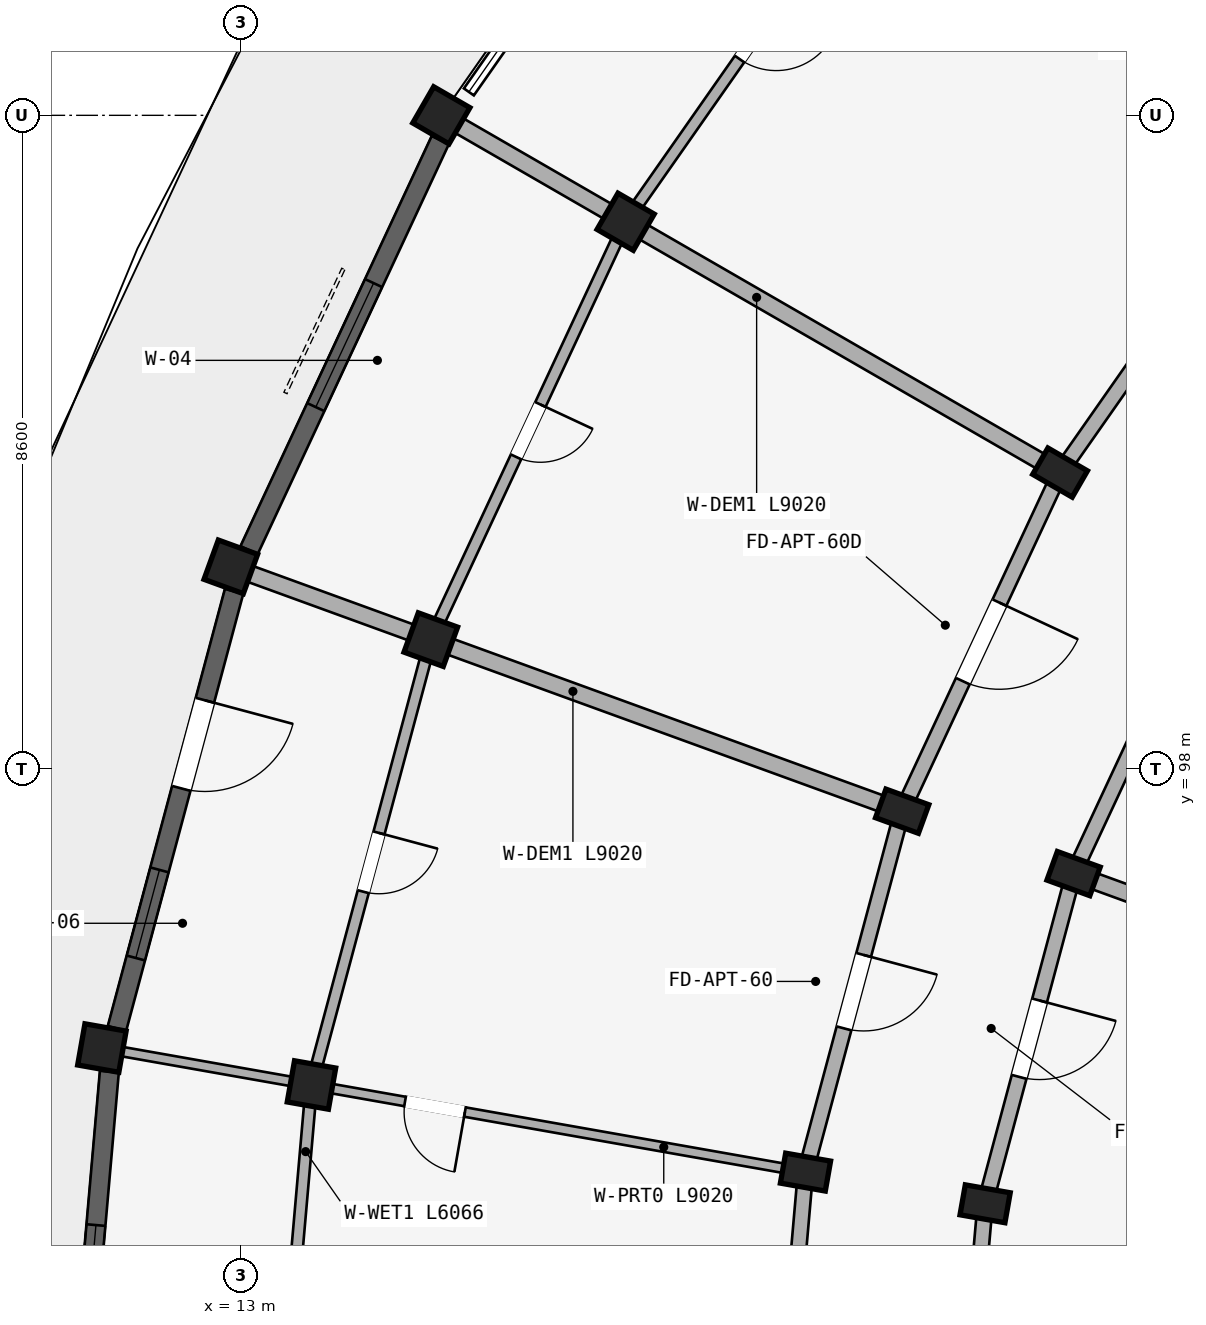
"""IFC4 building model, lengths in metres.
Left out: names, types, materials, properties, quantities, classifications, styles, units other than length and angle.
Written with IfcOpenShell. Run it as: python <this file> out.ifc"""

import sys

from ifc_helpers import new_model, si_unit, direction, frame, frame_2d, origin, origin_2d, place, context, subcontext, project, spatial, rectangle, extrude, element, fill, save


model = new_model("IFC4")
c1 = context("Model", 3, precision=1e-05, world=origin(), true_north=direction((0.0, 1.0)))
c2 = subcontext(c1, "Body", "Model", "MODEL_VIEW")
j1 = project(units=[si_unit("LENGTHUNIT", "METRE"), si_unit("PLANEANGLEUNIT", "RADIAN")], contexts=[c1])
p1 = place(None, origin())
s1 = spatial("IfcSite", under=j1, at=p1, CompositionType="ELEMENT")
p2 = place(p1, origin())
s2 = spatial("IfcBuilding", under=s1, at=p2, CompositionType="ELEMENT")
p3 = place(p2, frame((0.0, 0.0, 46.5)))
s3 = spatial("IfcBuildingStorey", under=s2, at=p3, CompositionType="ELEMENT", Elevation=46.5)
p4 = place(p3, frame((23.778, 101.9, 0.0), z_axis=(0.0, 0.0, 1.0), x_axis=(0.5, 0.866025403784, 0.0)))
e1 = element("IfcColumn", 1, at=p4, inside=s3, PredefinedType="COLUMN", context=c2, shape_type="SweptSolid", body=[
    extrude(rectangle(XDim=0.4, YDim=0.6, at=origin_2d()), origin(), (0.0, 0.0, 1.0), 2.93),
])
p5 = place(p3, frame((18.062, 105.2, 0.0), z_axis=(0.0, 0.0, 1.0), x_axis=(0.5, 0.866025403784, 0.0)))
e2 = element("IfcColumn", 2, at=p5, inside=s3, PredefinedType="COLUMN", context=c2, shape_type="SweptSolid", body=[
    extrude(rectangle(XDim=0.55, YDim=0.55, at=origin_2d()), origin(), (0.0, 0.0, 1.0), 2.93),
])
p6 = place(p3, frame((15.637, 106.6, 0.0), z_axis=(0.0, 0.0, 1.0), x_axis=(0.5, 0.866025403784, 0.0)))
e3 = element("IfcColumn", 3, at=p6, inside=s3, PredefinedType="COLUMN", context=c2, shape_type="SweptSolid", body=[
    extrude(rectangle(XDim=0.55, YDim=0.55, at=origin_2d()), origin(), (0.0, 0.0, 1.0), 2.97),
])
for number, where, z_axis, x_axis in (
    (4, (23.956, 96.624, 0.0), (0.0, 0.0, 1.0), (0.342, 0.94, 0.0)),
    (5, (21.701, 97.445, 0.0), (0.0, 0.0, 1.0), (0.342, 0.94, 0.0)),
):
    element("IfcColumn", number, at=place(p3, frame(where, z_axis=z_axis, x_axis=x_axis)), inside=s3, PredefinedType="COLUMN", context=c2, shape_type="SweptSolid", body=[
        extrude(rectangle(XDim=0.4, YDim=0.6, at=origin_2d()), origin(), (0.0, 0.0, 1.0), 2.93),
    ])
p7 = place(p3, frame((15.499, 99.702, 0.0), z_axis=(0.0, 0.0, 1.0), x_axis=(0.342020143326, 0.939692620786, 0.0)))
e6 = element("IfcColumn", 6, at=p7, inside=s3, PredefinedType="COLUMN", context=c2, shape_type="SweptSolid", body=[
    extrude(rectangle(XDim=0.55, YDim=0.55, at=origin_2d()), origin(), (0.0, 0.0, 1.0), 2.93),
])
p8 = place(p3, frame((12.868, 100.66, 0.0), z_axis=(0.0, 0.0, 1.0), x_axis=(0.342020143326, 0.939692620786, 0.0)))
e7 = element("IfcColumn", 7, at=p8, inside=s3, PredefinedType="COLUMN", context=c2, shape_type="SweptSolid", body=[
    extrude(rectangle(XDim=0.55, YDim=0.55, at=origin_2d()), origin(), (0.0, 0.0, 1.0), 2.97),
])
for number, where, z_axis, x_axis in (
    (8, (22.792, 92.28, 0.0), (0.0, 0.0, 1.0), (0.174, 0.985, 0.0)),
    (9, (20.428, 92.697, 0.0), (0.0, 0.0, 1.0), (0.174, 0.985, 0.0)),
):
    element("IfcColumn", number, at=place(p3, frame(where, z_axis=z_axis, x_axis=x_axis)), inside=s3, PredefinedType="COLUMN", context=c2, shape_type="SweptSolid", body=[
        extrude(rectangle(XDim=0.4, YDim=0.6, at=origin_2d()), origin(), (0.0, 0.0, 1.0), 2.93),
    ])
p9 = place(p3, frame((13.929, 93.843, 0.0), z_axis=(0.0, 0.0, 1.0), x_axis=(0.173648177667, 0.984807753012, 0.0)))
e10 = element("IfcColumn", 10, at=p9, inside=s3, PredefinedType="COLUMN", context=c2, shape_type="SweptSolid", body=[
    extrude(rectangle(XDim=0.55, YDim=0.55, at=origin_2d()), origin(), (0.0, 0.0, 1.0), 2.93),
])
p10 = place(p3, frame((11.171, 94.329, 0.0), z_axis=(0.0, 0.0, 1.0), x_axis=(0.173648177667, 0.984807753012, 0.0)))
e11 = element("IfcColumn", 11, at=p10, inside=s3, PredefinedType="COLUMN", context=c2, shape_type="SweptSolid", body=[
    extrude(rectangle(XDim=0.55, YDim=0.55, at=origin_2d()), origin(), (0.0, 0.0, 1.0), 2.97),
])
p11 = place(p3, frame((26.598, 105.927, 0.0), z_axis=(0.0, 0.0, 1.0), x_axis=(-0.573592335331, -0.819140911474, 0.0)))
e12 = element("IfcWall", 12, at=p11, inside=s3, PredefinedType="STANDARD", context=c2, shape_type="SweptSolid", body=[
    extrude(rectangle(XDim=4.916, YDim=0.2, at=frame_2d((2.458, 0.0))), origin(), (0.0, 0.0, 1.0), 2.372),
])
p12 = place(p3, frame((25.856, 100.7, 0.0), z_axis=(0.0, 0.0, 1.0), x_axis=(-0.422617978463, -0.906307919131, 0.0)))
e13 = element("IfcWall", 13, at=p12, inside=s3, PredefinedType="STANDARD", context=c2, shape_type="SweptSolid", body=[
    extrude(rectangle(XDim=4.497, YDim=0.2, at=frame_2d((2.249, 0.0))), origin(), (0.0, 0.0, 1.0), 2.372),
])
p13 = place(p3, frame((23.778, 101.9, 0.0), z_axis=(0.0, 0.0, 1.0), x_axis=(-0.422629854778, -0.906302381024, 0.0)))
e14 = element("IfcWall", 14, at=p13, inside=s3, PredefinedType="STANDARD", context=c2, shape_type="SweptSolid", body=[
    extrude(rectangle(XDim=4.915, YDim=0.2, at=frame_2d((2.458, 0.0))), origin(), (0.0, 0.0, 1.0), 2.372),
])
p14 = place(p13, frame((1.888, 0.0, 0.0)))
e15 = element("IfcOpeningElement", 15, at=p14, cuts=e14, PredefinedType="OPENING", context=c2, shape_type="SweptSolid", body=[
    extrude(rectangle(XDim=1.14, YDim=2.15, at=frame_2d((0.57, 1.075))), frame((0.0, 0.11, 0.0), z_axis=(0.0, -1.0, 0.0), x_axis=(1.0, 0.0, 0.0)), (0.0, 0.0, 1.0), 0.22),
])
p15 = place(p3, frame((23.956, 96.624, 0.0), z_axis=(0.0, 0.0, 1.0), x_axis=(-0.258787642463, -0.965934240054, 0.0)))
e16 = element("IfcWall", 16, at=p15, inside=s3, PredefinedType="STANDARD", context=c2, shape_type="SweptSolid", body=[
    extrude(rectangle(XDim=4.497, YDim=0.2, at=frame_2d((2.249, 0.0))), origin(), (0.0, 0.0, 1.0), 2.372),
])
p16 = place(p15, frame((1.729, 0.0, 0.0)))
e17 = element("IfcOpeningElement", 17, at=p16, cuts=e16, PredefinedType="OPENING", context=c2, shape_type="SweptSolid", body=[
    extrude(rectangle(XDim=1.04, YDim=2.15, at=frame_2d((0.52, 1.075))), frame((0.0, 0.11, 0.0), z_axis=(0.0, -1.0, 0.0), x_axis=(1.0, 0.0, 0.0)), (0.0, 0.0, 1.0), 0.22),
])
p17 = place(p3, frame((21.701, 97.445, 0.0), z_axis=(0.0, 0.0, 1.0), x_axis=(-0.258803112091, -0.965930095386, 0.0)))
e18 = element("IfcWall", 18, at=p17, inside=s3, PredefinedType="STANDARD", context=c2, shape_type="SweptSolid", body=[
    extrude(rectangle(XDim=4.916, YDim=0.2, at=frame_2d((2.458, 0.0))), origin(), (0.0, 0.0, 1.0), 2.372),
])
p18 = place(p17, frame((1.958, 0.0, 0.0)))
e19 = element("IfcOpeningElement", 19, at=p18, cuts=e18, PredefinedType="OPENING", context=c2, shape_type="SweptSolid", body=[
    extrude(rectangle(XDim=1.0, YDim=2.15, at=frame_2d((0.5, 1.075))), frame((0.0, 0.11, 0.0), z_axis=(0.0, -1.0, 0.0), x_axis=(1.0, 0.0, 0.0)), (0.0, 0.0, 1.0), 0.22),
])
p19 = place(p3, frame((22.792, 92.28, 0.0), z_axis=(0.0, 0.0, 1.0), x_axis=(-0.087187153726, -0.996191949488, 0.0)))
e20 = element("IfcWall", 20, at=p19, inside=s3, PredefinedType="STANDARD", context=c2, shape_type="SweptSolid", body=[
    extrude(rectangle(XDim=4.497, YDim=0.2, at=frame_2d((2.249, 0.0))), origin(), (0.0, 0.0, 1.0), 2.372),
])
p20 = place(p3, frame((20.428, 92.697, 0.0), z_axis=(0.0, 0.0, 1.0), x_axis=(-0.087167566415, -0.996193663584, 0.0)))
e21 = element("IfcWall", 21, at=p20, inside=s3, PredefinedType="STANDARD", context=c2, shape_type="SweptSolid", body=[
    extrude(rectangle(XDim=4.916, YDim=0.2, at=frame_2d((2.458, 0.0))), origin(), (0.0, 0.0, 1.0), 2.372),
])
p21 = place(p3, frame((26.521, 105.991, 0.0), z_axis=(0.0, 0.0, 1.0), x_axis=(-0.766047078847, 0.642784468535, 0.0)))
e22 = element("IfcWall", 22, at=p21, inside=s3, PredefinedType="PARTITIONING", context=c2, shape_type="SweptSolid", body=[
    extrude(rectangle(XDim=9.02, YDim=0.125, at=frame_2d((4.51, 0.0))), origin(), (0.0, 0.0, 1.0), 2.372),
])
p22 = place(p21, frame((4.45, 0.0, 0.0)))
e23 = element("IfcOpeningElement", 23, at=p22, cuts=e22, PredefinedType="OPENING", context=c2, shape_type="SweptSolid", body=[
    extrude(rectangle(XDim=0.8, YDim=2.1, at=frame_2d((0.4, 1.05))), frame((0.0, 0.073, 0.0), z_axis=(0.0, -1.0, 0.0), x_axis=(1.0, 0.0, 0.0)), (0.0, 0.0, 1.0), 0.145),
])
p23 = place(p3, frame((23.691, 101.95, 0.0), z_axis=(0.0, 0.0, 1.0), x_axis=(-0.866024222538, 0.500002045973, 0.0)))
e24 = element("IfcWall", 24, at=p23, inside=s3, PredefinedType="STANDARD", context=c2, shape_type="SweptSolid", body=[
    extrude(rectangle(XDim=9.02, YDim=0.22, at=frame_2d((4.51, 0.0))), origin(), (0.0, 0.0, 1.0), 2.372),
])
p24 = place(p3, frame((30.346, 94.298, 0.0), z_axis=(0.0, 0.0, 1.0), x_axis=(-0.939696231917, 0.342010221662, 0.0)))
e25 = element("IfcWall", 25, at=p24, inside=s3, PredefinedType="STANDARD", context=c2, shape_type="SweptSolid", body=[
    extrude(rectangle(XDim=6.75, YDim=0.22, at=frame_2d((3.375, 0.0))), origin(), (0.0, 0.0, 1.0), 2.372),
])
p25 = place(p3, frame((21.607, 97.479, 0.0), z_axis=(0.0, 0.0, 1.0), x_axis=(-0.939695392201, 0.342012528828, 0.0)))
e26 = element("IfcWall", 26, at=p25, inside=s3, PredefinedType="STANDARD", context=c2, shape_type="SweptSolid", body=[
    extrude(rectangle(XDim=9.02, YDim=0.22, at=frame_2d((4.51, 0.0))), origin(), (0.0, 0.0, 1.0), 2.372),
])
p26 = place(p3, frame((20.33, 92.714, 0.0), z_axis=(0.0, 0.0, 1.0), x_axis=(-0.98480997874, 0.173635554464, 0.0)))
e27 = element("IfcWall", 27, at=p26, inside=s3, PredefinedType="PARTITIONING", context=c2, shape_type="SweptSolid", body=[
    extrude(rectangle(XDim=9.02, YDim=0.125, at=frame_2d((4.51, 0.0))), origin(), (0.0, 0.0, 1.0), 2.372),
])
p27 = place(p26, frame((4.45, 0.0, 0.0)))
e28 = element("IfcOpeningElement", 28, at=p27, cuts=e27, PredefinedType="OPENING", context=c2, shape_type="SweptSolid", body=[
    extrude(rectangle(XDim=0.8, YDim=2.1, at=frame_2d((0.4, 1.05))), frame((0.0, 0.073, 0.0), z_axis=(0.0, -1.0, 0.0), x_axis=(1.0, 0.0, 0.0)), (0.0, 0.0, 1.0), 0.145),
])
p28 = place(p3, frame((21.542, 110.169, 0.0), z_axis=(0.0, 0.0, 1.0), x_axis=(-0.573594691504, -0.81913926159, 0.0)))
e29 = element("IfcWall", 29, at=p28, inside=s3, PredefinedType="PLUMBINGWALL", context=c2, shape_type="SweptSolid", body=[
    extrude(rectangle(XDim=6.066, YDim=0.15, at=frame_2d((3.033, 0.0))), origin(), (0.0, 0.0, 1.0), 2.372),
])
p29 = place(p28, frame((2.613, 0.0, 0.0)))
e30 = element("IfcOpeningElement", 30, at=p29, cuts=e29, PredefinedType="OPENING", context=c2, shape_type="SweptSolid", body=[
    extrude(rectangle(XDim=0.84, YDim=2.1, at=frame_2d((0.42, 1.05))), frame((0.0, 0.085, 0.0), z_axis=(0.0, -1.0, 0.0), x_axis=(1.0, 0.0, 0.0)), (0.0, 0.0, 1.0), 0.17),
])
p30 = place(p3, frame((18.062, 105.2, 0.0), z_axis=(0.0, 0.0, 1.0), x_axis=(-0.42260781991, -0.906312656069, 0.0)))
e31 = element("IfcWall", 31, at=p30, inside=s3, PredefinedType="PLUMBINGWALL", context=c2, shape_type="SweptSolid", body=[
    extrude(rectangle(XDim=6.066, YDim=0.15, at=frame_2d((3.033, 0.0))), origin(), (0.0, 0.0, 1.0), 2.372),
])
p31 = place(p30, frame((2.653, 0.0, 0.0)))
e32 = element("IfcOpeningElement", 32, at=p31, cuts=e31, PredefinedType="OPENING", context=c2, shape_type="SweptSolid", body=[
    extrude(rectangle(XDim=0.76, YDim=2.05, at=frame_2d((0.38, 1.025))), frame((0.0, 0.085, 0.0), z_axis=(0.0, -1.0, 0.0), x_axis=(1.0, 0.0, 0.0)), (0.0, 0.0, 1.0), 0.17),
])
p32 = place(p3, frame((15.499, 99.702, 0.0), z_axis=(0.0, 0.0, 1.0), x_axis=(-0.258827283048, -0.965923618901, 0.0)))
e33 = element("IfcWall", 33, at=p32, inside=s3, PredefinedType="PLUMBINGWALL", context=c2, shape_type="SweptSolid", body=[
    extrude(rectangle(XDim=6.066, YDim=0.15, at=frame_2d((3.033, 0.0))), origin(), (0.0, 0.0, 1.0), 2.372),
])
p33 = place(p32, frame((2.633, 0.0, 0.0)))
e34 = element("IfcOpeningElement", 34, at=p33, cuts=e33, PredefinedType="OPENING", context=c2, shape_type="SweptSolid", body=[
    extrude(rectangle(XDim=0.8, YDim=2.1, at=frame_2d((0.4, 1.05))), frame((0.0, 0.085, 0.0), z_axis=(0.0, -1.0, 0.0), x_axis=(1.0, 0.0, 0.0)), (0.0, 0.0, 1.0), 0.17),
])
p34 = place(p3, frame((13.929, 93.843, 0.0), z_axis=(0.0, 0.0, 1.0), x_axis=(-0.087174938512, -0.996193018494, 0.0)))
e35 = element("IfcWall", 35, at=p34, inside=s3, PredefinedType="PLUMBINGWALL", context=c2, shape_type="SweptSolid", body=[
    extrude(rectangle(XDim=6.066, YDim=0.15, at=frame_2d((3.033, 0.0))), origin(), (0.0, 0.0, 1.0), 2.372),
])
p35 = place(p34, frame((2.613, 0.0, 0.0)))
e36 = element("IfcOpeningElement", 36, at=p35, cuts=e35, PredefinedType="OPENING", context=c2, shape_type="SweptSolid", body=[
    extrude(rectangle(XDim=0.84, YDim=2.1, at=frame_2d((0.42, 1.05))), frame((0.0, 0.085, 0.0), z_axis=(0.0, -1.0, 0.0), x_axis=(1.0, 0.0, 0.0)), (0.0, 0.0, 1.0), 0.17),
])
p36 = place(p3, frame((15.624, 106.275, 0.0), z_axis=(0.0, 0.0, 1.0), x_axis=(-0.422636229619, -0.90629940826, 0.0)))
e37 = element("IfcWall", 37, at=p36, inside=s3, PredefinedType="STANDARD", context=c2, shape_type="SweptSolid", body=[
    extrude(rectangle(XDim=5.953, YDim=0.25, at=frame_2d((2.977, 0.0))), origin(), (0.0, 0.0, 1.0), 2.48),
])
p37 = place(p36, frame((2.076, 0.0, 0.63)))
e38 = element("IfcOpeningElement", 38, at=p37, cuts=e37, PredefinedType="OPENING", context=c2, shape_type="SweptSolid", body=[
    extrude(rectangle(XDim=1.8, YDim=1.65, at=frame_2d((0.9, 0.825))), frame((0.0, 0.135, 0.0), z_axis=(0.0, -1.0, 0.0), x_axis=(1.0, 0.0, 0.0)), (0.0, 0.0, 1.0), 0.27),
])
p38 = place(p3, frame((12.91, 100.337, 0.0), z_axis=(0.0, 0.0, 1.0), x_axis=(-0.258818764656, -0.965925901434, 0.0)))
e39 = element("IfcWall", 39, at=p38, inside=s3, PredefinedType="STANDARD", context=c2, shape_type="SweptSolid", body=[
    extrude(rectangle(XDim=5.953, YDim=0.25, at=frame_2d((2.977, 0.0))), origin(), (0.0, 0.0, 1.0), 2.48),
])
p39 = place(p38, frame((3.793, 0.0, 0.38)))
e40 = element("IfcOpeningElement", 40, at=p39, cuts=e39, PredefinedType="OPENING", context=c2, shape_type="SweptSolid", body=[
    extrude(rectangle(XDim=1.2, YDim=1.5, at=frame_2d((0.6, 0.75))), frame((0.0, 0.135, 0.0), z_axis=(0.0, -1.0, 0.0), x_axis=(1.0, 0.0, 0.0)), (0.0, 0.0, 1.0), 0.27),
])
p40 = place(p38, frame((1.484, 0.0, 0.0)))
e41 = element("IfcOpeningElement", 41, at=p40, cuts=e39, PredefinedType="OPENING", context=c2, shape_type="SweptSolid", body=[
    extrude(rectangle(XDim=1.2, YDim=2.15, at=frame_2d((0.6, 1.075))), frame((0.0, 0.135, 0.0), z_axis=(0.0, -1.0, 0.0), x_axis=(1.0, 0.0, 0.0)), (0.0, 0.0, 1.0), 0.27),
])
p41 = place(p3, frame((11.27, 94.019, 0.0), z_axis=(0.0, 0.0, 1.0), x_axis=(-0.087151687417, -0.996195052879, 0.0)))
e42 = element("IfcWall", 42, at=p41, inside=s3, PredefinedType="STANDARD", context=c2, shape_type="SweptSolid", body=[
    extrude(rectangle(XDim=5.953, YDim=0.25, at=frame_2d((2.977, 0.0))), origin(), (0.0, 0.0, 1.0), 2.48),
])
p42 = place(p41, frame((2.027, 0.0, 0.53)))
e43 = element("IfcOpeningElement", 43, at=p42, cuts=e42, PredefinedType="OPENING", context=c2, shape_type="SweptSolid", body=[
    extrude(rectangle(XDim=1.9, YDim=1.75, at=frame_2d((0.95, 0.875))), frame((0.0, 0.135, 0.0), z_axis=(0.0, -1.0, 0.0), x_axis=(1.0, 0.0, 0.0)), (0.0, 0.0, 1.0), 0.27),
])
p43 = place(p37, origin())
e44 = element("IfcWindow", 44, at=p43, inside=s3, PartitioningType="DOUBLE_PANEL_VERTICAL", PredefinedType="WINDOW", context=c2, shape_type="SweptSolid", body=[
    extrude(rectangle(XDim=1.8, YDim=1.65, at=frame_2d((0.9, 0.825))), frame((0.0, 0.03, 0.0), z_axis=(0.0, -1.0, 0.0), x_axis=(1.0, 0.0, 0.0)), (0.0, 0.0, 1.0), 0.06),
])
fill(e38, e44)
p44 = place(p39, origin())
e45 = element("IfcWindow", 45, at=p44, inside=s3, PartitioningType="SINGLE_PANEL", PredefinedType="WINDOW", context=c2, shape_type="SweptSolid", body=[
    extrude(rectangle(XDim=1.2, YDim=1.5, at=frame_2d((0.6, 0.75))), frame((0.0, 0.03, 0.0), z_axis=(0.0, -1.0, 0.0), x_axis=(1.0, 0.0, 0.0)), (0.0, 0.0, 1.0), 0.06),
])
fill(e40, e45)
p45 = place(p42, origin())
e46 = element("IfcWindow", 46, at=p45, inside=s3, PartitioningType="DOUBLE_PANEL_VERTICAL", PredefinedType="WINDOW", context=c2, shape_type="SweptSolid", body=[
    extrude(rectangle(XDim=1.9, YDim=1.75, at=frame_2d((0.95, 0.875))), frame((0.0, 0.03, 0.0), z_axis=(0.0, -1.0, 0.0), x_axis=(1.0, 0.0, 0.0)), (0.0, 0.0, 1.0), 0.06),
])
fill(e43, e46)
p46 = place(p27, origin())
e47 = element("IfcDoor", 47, at=p46, inside=s3, OperationType="SINGLE_SWING_LEFT", PredefinedType="DOOR", context=c2, shape_type="SweptSolid", body=[
    extrude(rectangle(XDim=0.8, YDim=2.1, at=frame_2d((0.4, 1.05))), frame((0.0, 0.025, 0.0), z_axis=(0.0, -1.0, 0.0), x_axis=(1.0, 0.0, 0.0)), (0.0, 0.0, 1.0), 0.05),
])
fill(e28, e47)
p47 = place(p29, frame((0.84, 0.0, 0.0), z_axis=(0.0, 0.0, 1.0), x_axis=(-1.0, 0.0, 0.0)))
e48 = element("IfcDoor", 48, at=p47, inside=s3, OperationType="SINGLE_SWING_RIGHT", PredefinedType="DOOR", context=c2, shape_type="SweptSolid", body=[
    extrude(rectangle(XDim=0.84, YDim=2.1, at=frame_2d((0.42, 1.05))), frame((0.0, 0.025, 0.0), z_axis=(0.0, -1.0, 0.0), x_axis=(1.0, 0.0, 0.0)), (0.0, 0.0, 1.0), 0.05),
])
fill(e30, e48)
p48 = place(p14, origin())
e49 = element("IfcDoor", 49, at=p48, inside=s3, OperationType="SINGLE_SWING_LEFT", PredefinedType="DOOR", context=c2, shape_type="SweptSolid", body=[
    extrude(rectangle(XDim=1.14, YDim=2.15, at=frame_2d((0.57, 1.075))), frame((0.0, 0.025, 0.0), z_axis=(0.0, -1.0, 0.0), x_axis=(1.0, 0.0, 0.0)), (0.0, 0.0, 1.0), 0.05),
])
fill(e15, e49)
p49 = place(p31, frame((0.76, 0.0, 0.0), z_axis=(0.0, 0.0, 1.0), x_axis=(-1.0, 0.0, 0.0)))
e50 = element("IfcDoor", 50, at=p49, inside=s3, OperationType="SINGLE_SWING_RIGHT", PredefinedType="DOOR", context=c2, shape_type="SweptSolid", body=[
    extrude(rectangle(XDim=0.76, YDim=2.05, at=frame_2d((0.38, 1.025))), frame((0.0, 0.025, 0.0), z_axis=(0.0, -1.0, 0.0), x_axis=(1.0, 0.0, 0.0)), (0.0, 0.0, 1.0), 0.05),
])
fill(e32, e50)
p50 = place(p18, origin())
e51 = element("IfcDoor", 51, at=p50, inside=s3, OperationType="SINGLE_SWING_LEFT", PredefinedType="DOOR", context=c2, shape_type="SweptSolid", body=[
    extrude(rectangle(XDim=1.0, YDim=2.15, at=frame_2d((0.5, 1.075))), frame((0.0, 0.025, 0.0), z_axis=(0.0, -1.0, 0.0), x_axis=(1.0, 0.0, 0.0)), (0.0, 0.0, 1.0), 0.05),
])
fill(e19, e51)
p51 = place(p33, frame((0.8, 0.0, 0.0), z_axis=(0.0, 0.0, 1.0), x_axis=(-1.0, 0.0, 0.0)))
e52 = element("IfcDoor", 52, at=p51, inside=s3, OperationType="SINGLE_SWING_RIGHT", PredefinedType="DOOR", context=c2, shape_type="SweptSolid", body=[
    extrude(rectangle(XDim=0.8, YDim=2.1, at=frame_2d((0.4, 1.05))), frame((0.0, 0.025, 0.0), z_axis=(0.0, -1.0, 0.0), x_axis=(1.0, 0.0, 0.0)), (0.0, 0.0, 1.0), 0.05),
])
fill(e34, e52)
p52 = place(p16, origin())
e53 = element("IfcDoor", 53, at=p52, inside=s3, OperationType="SINGLE_SWING_LEFT", PredefinedType="DOOR", context=c2, shape_type="SweptSolid", body=[
    extrude(rectangle(XDim=1.04, YDim=2.15, at=frame_2d((0.52, 1.075))), frame((0.0, 0.025, 0.0), z_axis=(0.0, -1.0, 0.0), x_axis=(1.0, 0.0, 0.0)), (0.0, 0.0, 1.0), 0.05),
])
fill(e17, e53)
p53 = place(p40, frame((1.2, 0.0, 0.0), z_axis=(0.0, 0.0, 1.0), x_axis=(-1.0, 0.0, 0.0)))
e54 = element("IfcDoor", 54, at=p53, inside=s3, OperationType="SINGLE_SWING_RIGHT", PredefinedType="DOOR", context=c2, shape_type="SweptSolid", body=[
    extrude(rectangle(XDim=1.2, YDim=2.15, at=frame_2d((0.6, 1.075))), frame((0.0, 0.025, 0.0), z_axis=(0.0, -1.0, 0.0), x_axis=(1.0, 0.0, 0.0)), (0.0, 0.0, 1.0), 0.05),
])
fill(e41, e54)
save(model, sys.argv[1])
